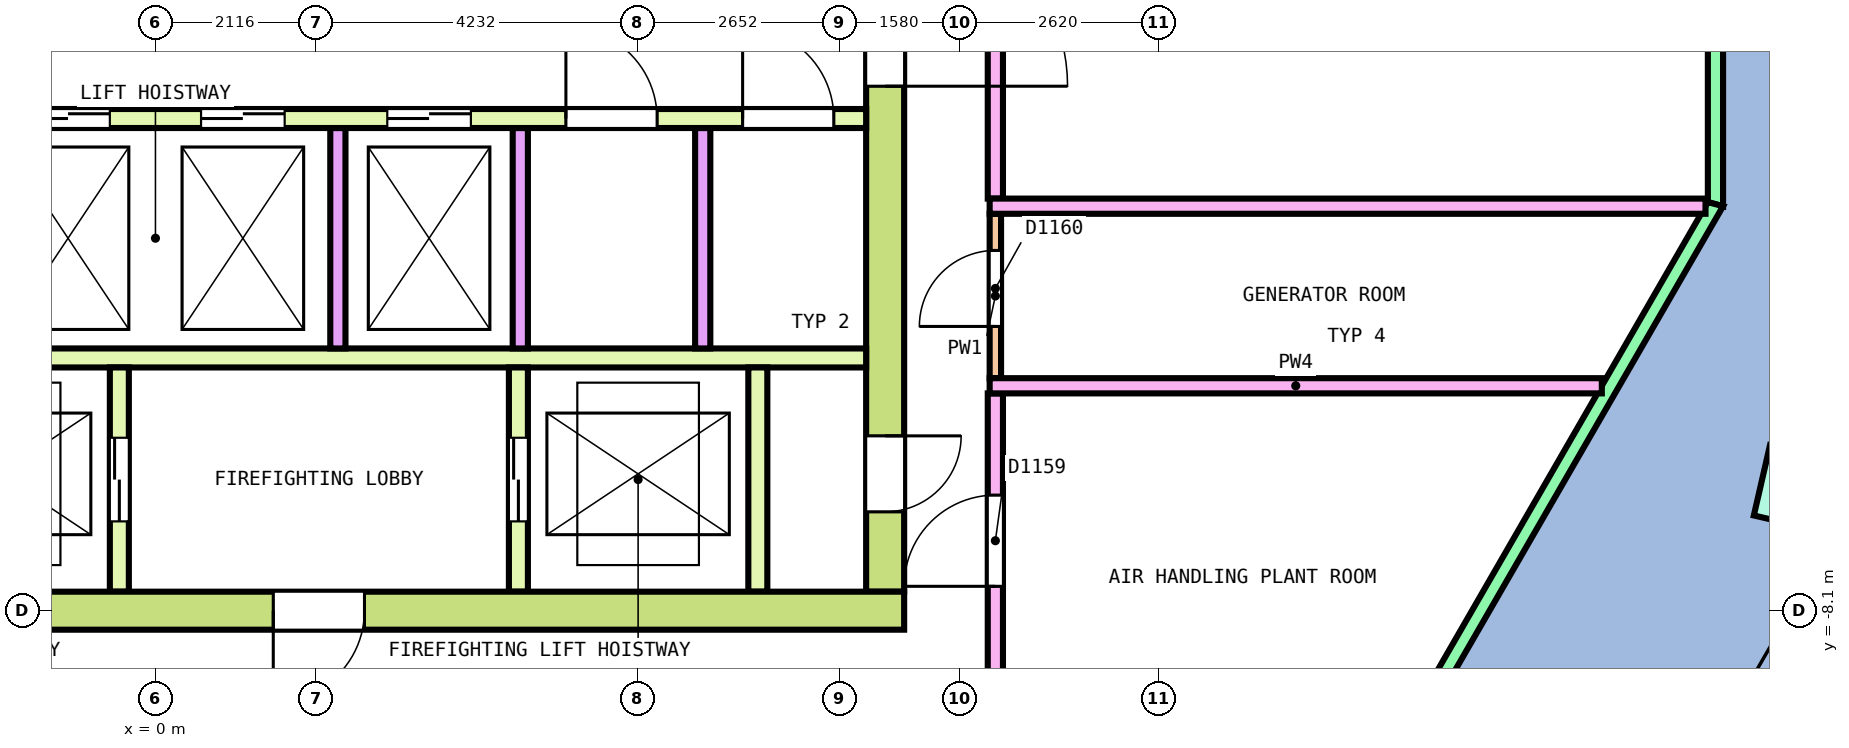
"""IFC4 building model, lengths in metres.
Left out: names, types, materials, properties, quantities, classifications, styles, units other than length and angle.
Written with IfcOpenShell. Run it as: python <this file> out.ifc"""

import sys

from ifc_helpers import new_model, si_unit, direction, frame, frame_2d, origin, origin_2d, place, context, subcontext, project, spatial, polyline, rectangle, outline, extrude, element, fill, save


model = new_model("IFC4")
c1 = context("Model", 3, precision=1e-05, world=origin(), true_north=direction((0.0, 1.0)))
c2 = subcontext(c1, "Body", "Model", "MODEL_VIEW")
j1 = project(units=[si_unit("LENGTHUNIT", "METRE"), si_unit("PLANEANGLEUNIT", "RADIAN")], contexts=[c1])
p1 = place(None, origin())
s1 = spatial("IfcSite", under=j1, at=p1, CompositionType="ELEMENT")
p2 = place(p1, origin())
s2 = spatial("IfcBuilding", under=s1, at=p2, CompositionType="ELEMENT")
p3 = place(p2, frame((0.0, 0.0, 303.0)))
s3 = spatial("IfcBuildingStorey", under=s2, at=p3, CompositionType="ELEMENT", Elevation=303.0)
p4 = place(p3, frame((23.324, -3.502, 0.0), z_axis=(-0.364651825772, 0.049128569612, 0.929846992579), x_axis=(0.017937707181, 0.99879246275, -0.045736801538)))
e1 = element("IfcColumn", 1, at=p4, inside=s3, PredefinedType="COLUMN", context=c2, shape_type="SweptSolid", body=[
    extrude(rectangle(XDim=0.95, YDim=0.95, at=origin_2d()), origin(), (0.0, 0.0, 1.0), 5.635),
])
p5 = place(p3, frame((19.872, -9.48, 0.0), z_axis=(-0.311737642499, 0.14738437924, 0.938667932234), x_axis=(0.491391865687, 0.87053510463, 0.026507846807)))
e2 = element("IfcColumn", 2, at=p5, inside=s3, PredefinedType="COLUMN", context=c2, shape_type="SweptSolid", body=[
    extrude(rectangle(XDim=0.95, YDim=0.95, at=origin_2d()), origin(), (0.0, 0.0, 1.0), 5.582),
])
p6 = place(p3, frame((21.598, -6.491, 0.0), z_axis=(-0.338831549302, 0.098179187986, 0.935710440384), x_axis=(0.47309306767, 0.877441072232, 0.079247170818)))
e3 = element("IfcColumn", 3, at=p6, inside=s3, PredefinedType="COLUMN", context=c2, shape_type="SweptSolid", body=[
    extrude(rectangle(XDim=0.95, YDim=0.95, at=origin_2d()), origin(), (0.0, 0.0, 1.0), 5.6),
])
p7 = place(p3, frame((20.524, -2.752, 0.0), z_axis=(0.0, 0.0, 1.0), x_axis=(0.0, 1.0, 0.0)))
e4 = element("IfcWall", 4, at=p7, inside=s3, PredefinedType="SOLIDWALL", context=c2, shape_type="SweptSolid", body=[
    extrude(outline(polyline([(-0.027, -0.1), (5.53, -0.1), (5.477, 0.1), (0.027, 0.1), (-0.027, -0.1)])), origin(), (0.0, 0.0, 1.0), 3.95),
])
p8 = place(p3, frame((12.645, -16.398, 0.0), z_axis=(0.0, 0.0, 1.0), x_axis=(0.499993368965, 0.86602923218, 0.0)))
e5 = element("IfcWall", 5, at=p8, inside=s3, PredefinedType="SOLIDWALL", context=c2, shape_type="SweptSolid", body=[
    extrude(outline(polyline([(-0.027, -0.1), (15.784, -0.1), (15.731, 0.1), (0.027, 0.1), (-0.027, -0.1)])), origin(), (0.0, 0.0, 1.0), 3.95),
])
p9 = place(p3, frame((-9.85, -8.1, 0.0), z_axis=(0.0, 0.0, 1.0), x_axis=(1.0, 0.0, 0.0)))
e6 = element("IfcWall", 6, at=p9, inside=s3, PredefinedType="SHEAR", context=c2, shape_type="SweptSolid", body=[
    extrude(rectangle(XDim=19.7, YDim=0.5, at=frame_2d((9.85, 0.0))), origin(), (0.0, 0.0, 1.0), 5.3),
])
p10 = place(p9, frame((11.4, 0.0, 0.0)))
e7 = element("IfcOpeningElement", 7, at=p10, cuts=e6, PredefinedType="OPENING", context=c2, shape_type="SweptSolid", body=[
    extrude(rectangle(XDim=1.2, YDim=2.1, at=frame_2d((0.6, 1.05))), frame((0.0, 0.26, 0.0), z_axis=(0.0, -1.0, 0.0), x_axis=(1.0, 0.0, 0.0)), (0.0, 0.0, 1.0), 0.52),
])
p11 = place(p3, frame((9.6, -7.85, 0.0), z_axis=(0.0, 0.0, 1.0), x_axis=(0.0, 1.0, 0.0)))
e8 = element("IfcWall", 8, at=p11, inside=s3, PredefinedType="SHEAR", context=c2, shape_type="SweptSolid", body=[
    extrude(rectangle(XDim=15.7, YDim=0.5, at=frame_2d((7.85, 0.0))), origin(), (0.0, 0.0, 1.0), 5.3),
])
p12 = place(p11, frame((6.65, 0.0, 0.0)))
e9 = element("IfcOpeningElement", 9, at=p12, cuts=e8, PredefinedType="OPENING", context=c2, shape_type="SweptSolid", body=[
    extrude(rectangle(XDim=2.4, YDim=2.1, at=frame_2d((1.2, 1.05))), frame((0.0, 0.26, 0.0), z_axis=(0.0, -1.0, 0.0), x_axis=(1.0, 0.0, 0.0)), (0.0, 0.0, 1.0), 0.52),
])
p13 = place(p11, frame((13.55, 0.0, 0.0)))
e10 = element("IfcOpeningElement", 10, at=p13, cuts=e8, PredefinedType="OPENING", context=c2, shape_type="SweptSolid", body=[
    extrude(rectangle(XDim=1.2, YDim=2.1, at=frame_2d((0.6, 1.05))), frame((0.0, 0.26, 0.0), z_axis=(0.0, -1.0, 0.0), x_axis=(1.0, 0.0, 0.0)), (0.0, 0.0, 1.0), 0.52),
])
p14 = place(p11, frame((1.05, 0.0, 0.0)))
e11 = element("IfcOpeningElement", 11, at=p14, cuts=e8, PredefinedType="OPENING", context=c2, shape_type="SweptSolid", body=[
    extrude(rectangle(XDim=1.0, YDim=2.1, at=frame_2d((0.5, 1.05))), frame((0.0, 0.26, 0.0), z_axis=(0.0, -1.0, 0.0), x_axis=(1.0, 0.0, 0.0)), (0.0, 0.0, 1.0), 0.52),
])
p15 = place(p3, frame((-9.35, -1.625, 0.0), z_axis=(0.0, 0.0, 1.0), x_axis=(1.0, 0.0, 0.0)))
e12 = element("IfcWall", 12, at=p15, inside=s3, PredefinedType="SOLIDWALL", context=c2, shape_type="SweptSolid", body=[
    extrude(rectangle(XDim=18.7, YDim=0.25, at=frame_2d((9.35, 0.0))), origin(), (0.0, 0.0, 1.0), 5.3),
])
p16 = place(p15, frame((7.65, 0.0, 0.0)))
e13 = element("IfcOpeningElement", 13, at=p16, cuts=e12, PredefinedType="OPENING", context=c2, shape_type="SweptSolid", body=[
    extrude(rectangle(XDim=1.1, YDim=2.1, at=frame_2d((0.55, 1.05))), frame((0.0, 0.135, 0.0), z_axis=(0.0, -1.0, 0.0), x_axis=(1.0, 0.0, 0.0)), (0.0, 0.0, 1.0), 0.27),
])
p17 = place(p15, frame((9.95, 0.0, 0.0)))
e14 = element("IfcOpeningElement", 14, at=p17, cuts=e12, PredefinedType="OPENING", context=c2, shape_type="SweptSolid", body=[
    extrude(rectangle(XDim=1.1, YDim=2.1, at=frame_2d((0.55, 1.05))), frame((0.0, 0.135, 0.0), z_axis=(0.0, -1.0, 0.0), x_axis=(1.0, 0.0, 0.0)), (0.0, 0.0, 1.0), 0.27),
])
p18 = place(p15, frame((12.4, 0.0, 0.0)))
e15 = element("IfcOpeningElement", 15, at=p18, cuts=e12, PredefinedType="OPENING", context=c2, shape_type="SweptSolid", body=[
    extrude(rectangle(XDim=1.1, YDim=2.1, at=frame_2d((0.55, 1.05))), frame((0.0, 0.135, 0.0), z_axis=(0.0, -1.0, 0.0), x_axis=(1.0, 0.0, 0.0)), (0.0, 0.0, 1.0), 0.27),
])
p19 = place(p15, frame((0.425, 0.0, 0.0)))
e16 = element("IfcOpeningElement", 16, at=p19, cuts=e12, PredefinedType="OPENING", context=c2, shape_type="SweptSolid", body=[
    extrude(rectangle(XDim=1.2, YDim=2.1, at=frame_2d((0.6, 1.05))), frame((0.0, 0.135, 0.0), z_axis=(0.0, -1.0, 0.0), x_axis=(1.0, 0.0, 0.0)), (0.0, 0.0, 1.0), 0.27),
])
p20 = place(p15, frame((3.95, 0.0, 0.0)))
e17 = element("IfcOpeningElement", 17, at=p20, cuts=e12, PredefinedType="OPENING", context=c2, shape_type="SweptSolid", body=[
    extrude(rectangle(XDim=1.2, YDim=2.1, at=frame_2d((0.6, 1.05))), frame((0.0, 0.135, 0.0), z_axis=(0.0, -1.0, 0.0), x_axis=(1.0, 0.0, 0.0)), (0.0, 0.0, 1.0), 0.27),
])
p21 = place(p15, frame((14.75, 0.0, 0.0)))
e18 = element("IfcOpeningElement", 18, at=p21, cuts=e12, PredefinedType="OPENING", context=c2, shape_type="SweptSolid", body=[
    extrude(rectangle(XDim=1.2, YDim=2.1, at=frame_2d((0.6, 1.05))), frame((0.0, 0.135, 0.0), z_axis=(0.0, -1.0, 0.0), x_axis=(1.0, 0.0, 0.0)), (0.0, 0.0, 1.0), 0.27),
])
p22 = place(p15, frame((17.075, 0.0, 0.0)))
e19 = element("IfcOpeningElement", 19, at=p22, cuts=e12, PredefinedType="OPENING", context=c2, shape_type="SweptSolid", body=[
    extrude(rectangle(XDim=1.2, YDim=2.1, at=frame_2d((0.6, 1.05))), frame((0.0, 0.135, 0.0), z_axis=(0.0, -1.0, 0.0), x_axis=(1.0, 0.0, 0.0)), (0.0, 0.0, 1.0), 0.27),
])
p23 = place(p3, frame((-9.35, -4.775, 0.0), z_axis=(0.0, 0.0, 1.0), x_axis=(1.0, 0.0, 0.0)))
e20 = element("IfcWall", 20, at=p23, inside=s3, PredefinedType="SOLIDWALL", context=c2, shape_type="SweptSolid", body=[
    extrude(rectangle(XDim=18.7, YDim=0.25, at=frame_2d((9.35, 0.0))), origin(), (0.0, 0.0, 1.0), 5.3),
])
for number, where, z_axis, x_axis in (
    (21, (2.4, -4.65, 0.0), (0.0, 0.0, 1.0), (0.0, 1.0, 0.0)),
    (22, (4.8, -4.65, 0.0), (0.0, 0.0, 1.0), (0.0, 1.0, 0.0)),
    (23, (7.2, -4.65, 0.0), (0.0, 0.0, 1.0), (0.0, 1.0, 0.0)),
):
    element("IfcWall", number, at=place(p3, frame(where, z_axis=z_axis, x_axis=x_axis)), inside=s3, PredefinedType="SOLIDWALL", context=c2, shape_type="SweptSolid", body=[
        extrude(rectangle(XDim=2.9, YDim=0.2, at=frame_2d((1.45, 0.0))), origin(), (0.0, 0.0, 1.0), 5.3),
    ])
p24 = place(p3, frame((-0.475, -7.85, 0.0), z_axis=(0.0, 0.0, 1.0), x_axis=(0.0, 1.0, 0.0)))
e24 = element("IfcWall", 24, at=p24, inside=s3, PredefinedType="SOLIDWALL", context=c2, shape_type="SweptSolid", body=[
    extrude(rectangle(XDim=2.95, YDim=0.25, at=frame_2d((1.475, 0.0))), origin(), (0.0, 0.0, 1.0), 5.3),
])
p25 = place(p24, frame((0.925, 0.0, 0.0)))
e25 = element("IfcOpeningElement", 25, at=p25, cuts=e24, PredefinedType="OPENING", context=c2, shape_type="SweptSolid", body=[
    extrude(rectangle(XDim=1.1, YDim=2.1, at=frame_2d((0.55, 1.05))), frame((0.0, 0.135, 0.0), z_axis=(0.0, -1.0, 0.0), x_axis=(1.0, 0.0, 0.0)), (0.0, 0.0, 1.0), 0.27),
])
p26 = place(p3, frame((4.775, -7.85, 0.0), z_axis=(0.0, 0.0, 1.0), x_axis=(0.0, 1.0, 0.0)))
e26 = element("IfcWall", 26, at=p26, inside=s3, PredefinedType="SOLIDWALL", context=c2, shape_type="SweptSolid", body=[
    extrude(rectangle(XDim=2.95, YDim=0.25, at=frame_2d((1.475, 0.0))), origin(), (0.0, 0.0, 1.0), 5.3),
])
p27 = place(p26, frame((0.925, 0.0, 0.0)))
e27 = element("IfcOpeningElement", 27, at=p27, cuts=e26, PredefinedType="OPENING", context=c2, shape_type="SweptSolid", body=[
    extrude(rectangle(XDim=1.1, YDim=2.1, at=frame_2d((0.55, 1.05))), frame((0.0, 0.135, 0.0), z_axis=(0.0, -1.0, 0.0), x_axis=(1.0, 0.0, 0.0)), (0.0, 0.0, 1.0), 0.27),
])
p28 = place(p3, frame((7.925, -7.85, 0.0), z_axis=(0.0, 0.0, 1.0), x_axis=(0.0, 1.0, 0.0)))
e28 = element("IfcWall", 28, at=p28, inside=s3, PredefinedType="SOLIDWALL", context=c2, shape_type="SweptSolid", body=[
    extrude(rectangle(XDim=2.95, YDim=0.25, at=frame_2d((1.475, 0.0))), origin(), (0.0, 0.0, 1.0), 5.3),
])
p29 = place(p3, frame((11.05, -5.041, 0.0), z_axis=(0.0, 0.0, 1.0), x_axis=(0.0, 1.0, 0.0)))
e29 = element("IfcWall", 29, at=p29, inside=s3, PredefinedType="PARTITIONING", context=c2, shape_type="SweptSolid", body=[
    extrude(rectangle(XDim=2.163, YDim=0.15, at=frame_2d((1.082, 0.0))), origin(), (0.0, 0.0, 1.0), 4.65),
])
p30 = place(p29, frame((0.681, 0.0, 0.0)))
e30 = element("IfcOpeningElement", 30, at=p30, cuts=e29, PredefinedType="OPENING", context=c2, shape_type="SweptSolid", body=[
    extrude(rectangle(XDim=1.0, YDim=2.1, at=frame_2d((0.5, 1.05))), frame((0.0, 0.085, 0.0), z_axis=(0.0, -1.0, 0.0), x_axis=(1.0, 0.0, 0.0)), (0.0, 0.0, 1.0), 0.17),
])
p31 = place(p3, frame((11.05, -10.05, 0.0), z_axis=(0.0, 0.0, 1.0), x_axis=(0.0, 1.0, 0.0)))
e31 = element("IfcWall", 31, at=p31, inside=s3, PredefinedType="PARTITIONING", context=c2, shape_type="SweptSolid", body=[
    extrude(rectangle(XDim=4.809, YDim=0.2, at=frame_2d((2.404, 0.0))), origin(), (0.0, 0.0, 1.0), 4.65),
])
p32 = place(p31, frame((2.271, 0.0, 0.0)))
e32 = element("IfcOpeningElement", 32, at=p32, cuts=e31, PredefinedType="OPENING", context=c2, shape_type="SweptSolid", body=[
    extrude(rectangle(XDim=1.2, YDim=2.1, at=frame_2d((0.6, 1.05))), frame((0.0, 0.11, 0.0), z_axis=(0.0, -1.0, 0.0), x_axis=(1.0, 0.0, 0.0)), (0.0, 0.0, 1.0), 0.22),
])
p33 = place(p3, frame((11.05, -2.678, 0.0), z_axis=(0.0, 0.0, 1.0), x_axis=(0.0, 1.0, 0.0)))
e33 = element("IfcWall", 33, at=p33, inside=s3, PredefinedType="PARTITIONING", context=c2, shape_type="SweptSolid", body=[
    extrude(rectangle(XDim=12.729, YDim=0.2, at=frame_2d((6.364, 0.0))), origin(), (0.0, 0.0, 1.0), 4.65),
])
p34 = place(p33, frame((9.364, 0.0, 0.0)))
e34 = element("IfcOpeningElement", 34, at=p34, cuts=e33, PredefinedType="OPENING", context=c2, shape_type="SweptSolid", body=[
    extrude(rectangle(XDim=1.2, YDim=2.1, at=frame_2d((0.6, 1.05))), frame((0.0, 0.11, 0.0), z_axis=(0.0, -1.0, 0.0), x_axis=(1.0, 0.0, 0.0)), (0.0, 0.0, 1.0), 0.22),
])
p35 = place(p33, frame((2.627, 0.0, 0.0)))
e35 = element("IfcOpeningElement", 35, at=p35, cuts=e33, PredefinedType="OPENING", context=c2, shape_type="SweptSolid", body=[
    extrude(rectangle(XDim=1.2, YDim=2.1, at=frame_2d((0.6, 1.05))), frame((0.0, 0.11, 0.0), z_axis=(0.0, -1.0, 0.0), x_axis=(1.0, 0.0, 0.0)), (0.0, 0.0, 1.0), 0.22),
])
p36 = place(p3, frame((10.975, -5.141, 0.0), z_axis=(0.0, 0.0, 1.0), x_axis=(1.0, 0.0, 0.0)))
e36 = element("IfcWall", 36, at=p36, inside=s3, PredefinedType="PARTITIONING", context=c2, shape_type="SweptSolid", body=[
    extrude(rectangle(XDim=8.054, YDim=0.2, at=frame_2d((4.027, 0.0))), origin(), (0.0, 0.0, 1.0), 4.65),
])
p37 = place(p3, frame((10.975, -2.779, 0.0), z_axis=(0.0, 0.0, 1.0), x_axis=(1.0, 0.0, 0.0)))
e37 = element("IfcWall", 37, at=p37, inside=s3, PredefinedType="PARTITIONING", context=c2, shape_type="SweptSolid", body=[
    extrude(rectangle(XDim=9.418, YDim=0.2, at=frame_2d((4.709, 0.0))), origin(), (0.0, 0.0, 1.0), 4.65),
])
p38 = place(p16, origin())
e38 = element("IfcDoor", 38, at=p38, inside=s3, OperationType="DOUBLE_DOOR_SLIDING", PredefinedType="DOOR", context=c2, shape_type="SweptSolid", body=[
    extrude(rectangle(XDim=1.1, YDim=2.1, at=frame_2d((0.55, 1.05))), frame((0.0, 0.075, 0.0), z_axis=(0.0, -1.0, 0.0), x_axis=(1.0, 0.0, 0.0)), (0.0, 0.0, 1.0), 0.15),
])
fill(e13, e38)
p39 = place(p17, origin())
e39 = element("IfcDoor", 39, at=p39, inside=s3, OperationType="DOUBLE_DOOR_SLIDING", PredefinedType="DOOR", context=c2, shape_type="SweptSolid", body=[
    extrude(rectangle(XDim=1.1, YDim=2.1, at=frame_2d((0.55, 1.05))), frame((0.0, 0.075, 0.0), z_axis=(0.0, -1.0, 0.0), x_axis=(1.0, 0.0, 0.0)), (0.0, 0.0, 1.0), 0.15),
])
fill(e14, e39)
p40 = place(p18, origin())
e40 = element("IfcDoor", 40, at=p40, inside=s3, OperationType="DOUBLE_DOOR_SLIDING", PredefinedType="DOOR", context=c2, shape_type="SweptSolid", body=[
    extrude(rectangle(XDim=1.1, YDim=2.1, at=frame_2d((0.55, 1.05))), frame((0.0, 0.075, 0.0), z_axis=(0.0, -1.0, 0.0), x_axis=(1.0, 0.0, 0.0)), (0.0, 0.0, 1.0), 0.15),
])
fill(e15, e40)
p41 = place(p25, origin())
e41 = element("IfcDoor", 41, at=p41, inside=s3, OperationType="DOUBLE_DOOR_SLIDING", PredefinedType="DOOR", context=c2, shape_type="SweptSolid", body=[
    extrude(rectangle(XDim=1.1, YDim=2.1, at=frame_2d((0.55, 1.05))), frame((0.0, 0.075, 0.0), z_axis=(0.0, -1.0, 0.0), x_axis=(1.0, 0.0, 0.0)), (0.0, 0.0, 1.0), 0.15),
])
fill(e25, e41)
p42 = place(p27, origin())
e42 = element("IfcDoor", 42, at=p42, inside=s3, OperationType="DOUBLE_DOOR_SLIDING", PredefinedType="DOOR", context=c2, shape_type="SweptSolid", body=[
    extrude(rectangle(XDim=1.1, YDim=2.1, at=frame_2d((0.55, 1.05))), frame((0.0, 0.075, 0.0), z_axis=(0.0, -1.0, 0.0), x_axis=(1.0, 0.0, 0.0)), (0.0, 0.0, 1.0), 0.15),
])
fill(e27, e42)
p43 = place(p12, origin())
e43 = element("IfcDoor", 43, at=p43, inside=s3, OperationType="DOUBLE_DOOR_SINGLE_SWING", PredefinedType="DOOR", context=c2, shape_type="SweptSolid", body=[
    extrude(rectangle(XDim=2.4, YDim=2.1, at=frame_2d((1.2, 1.05))), frame((0.0, 0.2, 0.0), z_axis=(0.0, -1.0, 0.0), x_axis=(1.0, 0.0, 0.0)), (0.0, 0.0, 1.0), 0.4),
])
fill(e9, e43)
p44 = place(p10, origin())
e44 = element("IfcDoor", 44, at=p44, inside=s3, OperationType="SINGLE_SWING_RIGHT", PredefinedType="DOOR", context=c2, shape_type="SweptSolid", body=[
    extrude(rectangle(XDim=1.2, YDim=2.1, at=frame_2d((0.6, 1.05))), frame((0.0, 0.2, 0.0), z_axis=(0.0, -1.0, 0.0), x_axis=(1.0, 0.0, 0.0)), (0.0, 0.0, 1.0), 0.4),
])
fill(e7, e44)
p45 = place(p14, origin())
e45 = element("IfcDoor", 45, at=p45, inside=s3, OperationType="SINGLE_SWING_RIGHT", PredefinedType="DOOR", context=c2, shape_type="SweptSolid", body=[
    extrude(rectangle(XDim=1.0, YDim=2.1, at=frame_2d((0.5, 1.05))), frame((0.0, 0.2, 0.0), z_axis=(0.0, -1.0, 0.0), x_axis=(1.0, 0.0, 0.0)), (0.0, 0.0, 1.0), 0.4),
])
fill(e11, e45)
p46 = place(p21, origin())
e46 = element("IfcDoor", 46, at=p46, inside=s3, OperationType="SINGLE_SWING_LEFT", PredefinedType="DOOR", context=c2, shape_type="SweptSolid", body=[
    extrude(rectangle(XDim=1.2, YDim=2.1, at=frame_2d((0.6, 1.05))), frame((0.0, 0.075, 0.0), z_axis=(0.0, -1.0, 0.0), x_axis=(1.0, 0.0, 0.0)), (0.0, 0.0, 1.0), 0.15),
])
fill(e18, e46)
p47 = place(p22, origin())
e47 = element("IfcDoor", 47, at=p47, inside=s3, OperationType="SINGLE_SWING_RIGHT", PredefinedType="DOOR", context=c2, shape_type="SweptSolid", body=[
    extrude(rectangle(XDim=1.2, YDim=2.1, at=frame_2d((0.6, 1.05))), frame((0.0, 0.075, 0.0), z_axis=(0.0, -1.0, 0.0), x_axis=(1.0, 0.0, 0.0)), (0.0, 0.0, 1.0), 0.15),
])
fill(e19, e47)
p48 = place(p32, origin())
e48 = element("IfcDoor", 48, at=p48, inside=s3, OperationType="DOUBLE_DOOR_SINGLE_SWING", PredefinedType="DOOR", context=c2, shape_type="SweptSolid", body=[
    extrude(rectangle(XDim=1.2, YDim=2.1, at=frame_2d((0.6, 1.05))), frame((0.0, 0.025, 0.0), z_axis=(0.0, -1.0, 0.0), x_axis=(1.0, 0.0, 0.0)), (0.0, 0.0, 1.0), 0.05),
])
fill(e32, e48)
p49 = place(p30, origin())
e49 = element("IfcDoor", 49, at=p49, inside=s3, OperationType="SINGLE_SWING_RIGHT", PredefinedType="DOOR", context=c2, shape_type="SweptSolid", body=[
    extrude(rectangle(XDim=1.0, YDim=2.1, at=frame_2d((0.5, 1.05))), frame((0.0, 0.025, 0.0), z_axis=(0.0, -1.0, 0.0), x_axis=(1.0, 0.0, 0.0)), (0.0, 0.0, 1.0), 0.05),
])
fill(e30, e49)
save(model, sys.argv[1])
